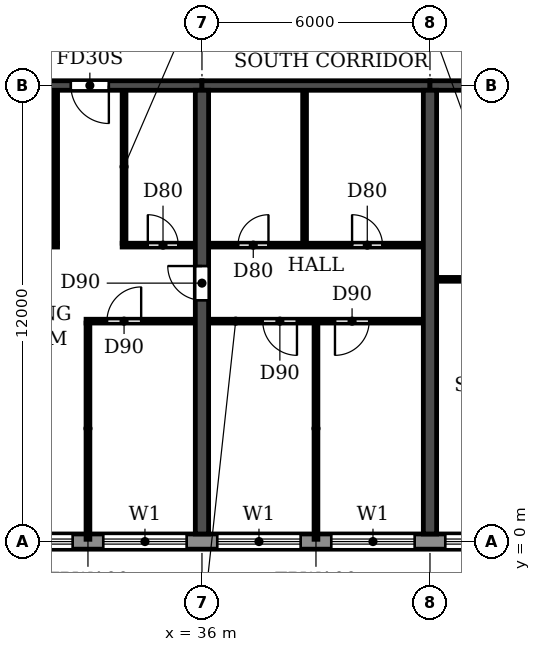
"""IFC4 building model, lengths in metres.
Left out: names, types, materials, properties, quantities, classifications, styles, units other than length and angle.
Written with IfcOpenShell. Run it as: python <this file> out.ifc"""

import sys

from ifc_helpers import new_model, si_unit, direction, frame, frame_2d, origin, place, context, subcontext, project, spatial, rectangle, extrude, element, fill, save


model = new_model("IFC4")
c1 = context("Model", 3, precision=1e-05, world=origin(), true_north=direction((0.0, 1.0)))
c2 = subcontext(c1, "Body", "Model", "MODEL_VIEW")
j1 = project(units=[si_unit("LENGTHUNIT", "METRE"), si_unit("PLANEANGLEUNIT", "RADIAN")], contexts=[c1])
p1 = place(None, origin())
s1 = spatial("IfcSite", under=j1, at=p1, CompositionType="ELEMENT")
p2 = place(p1, origin())
s2 = spatial("IfcBuilding", under=s1, at=p2, CompositionType="ELEMENT")
p3 = place(p2, frame((0.0, 0.0, 109.2)))
s3 = spatial("IfcBuildingStorey", under=s2, at=p3, CompositionType="ELEMENT", Elevation=109.2)
p4 = place(p3, frame((36.0, 0.2, 0.0), z_axis=(0.0, 0.0, 1.0), x_axis=(0.0, 1.0, 0.0)))
e1 = element("IfcWall", 1, at=p4, inside=s3, PredefinedType="SHEAR", context=c2, shape_type="SweptSolid", body=[
    extrude(rectangle(XDim=11.675, YDim=0.35, at=frame_2d((5.837, 0.0))), origin(), (0.0, 0.0, 1.0), 3.06),
])
p5 = place(p4, frame((6.15, 0.0, 0.0)))
e2 = element("IfcOpeningElement", 2, at=p5, cuts=e1, PredefinedType="OPENING", context=c2, shape_type="SweptSolid", body=[
    extrude(rectangle(XDim=0.9, YDim=2.1, at=frame_2d((0.45, 1.05))), frame((0.0, 0.185, 0.0), z_axis=(0.0, -1.0, 0.0), x_axis=(1.0, 0.0, 0.0)), (0.0, 0.0, 1.0), 0.37),
])
p6 = place(p3, frame((42.0, 0.2, 0.0), z_axis=(0.0, 0.0, 1.0), x_axis=(0.0, 1.0, 0.0)))
e3 = element("IfcWall", 3, at=p6, inside=s3, PredefinedType="SHEAR", context=c2, shape_type="SweptSolid", body=[
    extrude(rectangle(XDim=11.675, YDim=0.35, at=frame_2d((5.837, 0.0))), origin(), (0.0, 0.0, 1.0), 3.06),
])
p7 = place(p3, frame((30.0, 12.0, 0.0), z_axis=(0.0, 0.0, 1.0), x_axis=(1.0, 0.0, 0.0)))
e4 = element("IfcWall", 4, at=p7, inside=s3, PredefinedType="SHEAR", context=c2, shape_type="SweptSolid", body=[
    extrude(rectangle(XDim=6.0, YDim=0.25, at=frame_2d((3.0, 0.0))), origin(), (0.0, 0.0, 1.0), 2.46),
])
p8 = place(p7, frame((2.55, 0.0, 0.0)))
e5 = element("IfcOpeningElement", 5, at=p8, cuts=e4, PredefinedType="OPENING", context=c2, shape_type="SweptSolid", body=[
    extrude(rectangle(XDim=1.0, YDim=2.1, at=frame_2d((0.5, 1.05))), frame((0.0, 0.135, 0.0), z_axis=(0.0, -1.0, 0.0), x_axis=(1.0, 0.0, 0.0)), (0.0, 0.0, 1.0), 0.27),
])
p9 = place(p3, frame((36.0, 12.0, 0.0), z_axis=(0.0, 0.0, 1.0), x_axis=(1.0, 0.0, 0.0)))
e6 = element("IfcWall", 6, at=p9, inside=s3, PredefinedType="SHEAR", context=c2, shape_type="SweptSolid", body=[
    extrude(rectangle(XDim=6.0, YDim=0.25, at=frame_2d((3.0, 0.0))), origin(), (0.0, 0.0, 1.0), 2.46),
])
p10 = place(p3, frame((42.0, 12.0, 0.0), z_axis=(0.0, 0.0, 1.0), x_axis=(1.0, 0.0, 0.0)))
e7 = element("IfcWall", 7, at=p10, inside=s3, PredefinedType="SHEAR", context=c2, shape_type="SweptSolid", body=[
    extrude(rectangle(XDim=6.0, YDim=0.25, at=frame_2d((3.0, 0.0))), origin(), (0.0, 0.0, 1.0), 2.46),
])
p11 = place(p10, frame((2.45, 0.0, 0.0)))
e8 = element("IfcOpeningElement", 8, at=p11, cuts=e7, PredefinedType="OPENING", context=c2, shape_type="SweptSolid", body=[
    extrude(rectangle(XDim=1.0, YDim=2.1, at=frame_2d((0.5, 1.05))), frame((0.0, 0.135, 0.0), z_axis=(0.0, -1.0, 0.0), x_axis=(1.0, 0.0, 0.0)), (0.0, 0.0, 1.0), 0.27),
])
p12 = place(p3, frame((16.683, 0.0, 0.0), z_axis=(0.0, 0.0, 1.0), x_axis=(1.0, 0.0, 0.0)))
e9 = element("IfcWall", 9, at=p12, inside=s3, PredefinedType="STANDARD", context=c2, shape_type="SweptSolid", body=[
    extrude(rectangle(XDim=68.634, YDim=0.4, at=frame_2d((34.317, 0.0))), origin(), (0.0, 0.0, 1.0), 3.06),
])
p13 = place(p12, frame((1.717, 0.0, 0.9)))
e10 = element("IfcOpeningElement", 10, at=p13, cuts=e9, PredefinedType="OPENING", context=c2, shape_type="SweptSolid", body=[
    extrude(rectangle(XDim=2.2, YDim=1.5, at=frame_2d((1.1, 0.75))), frame((0.0, 0.21, 0.0), z_axis=(0.0, -1.0, 0.0), x_axis=(1.0, 0.0, 0.0)), (0.0, 0.0, 1.0), 0.42),
])
p14 = place(p12, frame((4.717, 0.0, 0.9)))
e11 = element("IfcOpeningElement", 11, at=p14, cuts=e9, PredefinedType="OPENING", context=c2, shape_type="SweptSolid", body=[
    extrude(rectangle(XDim=2.2, YDim=1.5, at=frame_2d((1.1, 0.75))), frame((0.0, 0.21, 0.0), z_axis=(0.0, -1.0, 0.0), x_axis=(1.0, 0.0, 0.0)), (0.0, 0.0, 1.0), 0.42),
])
p15 = place(p12, frame((7.717, 0.0, 0.9)))
e12 = element("IfcOpeningElement", 12, at=p15, cuts=e9, PredefinedType="OPENING", context=c2, shape_type="SweptSolid", body=[
    extrude(rectangle(XDim=2.2, YDim=1.5, at=frame_2d((1.1, 0.75))), frame((0.0, 0.21, 0.0), z_axis=(0.0, -1.0, 0.0), x_axis=(1.0, 0.0, 0.0)), (0.0, 0.0, 1.0), 0.42),
])
p16 = place(p12, frame((10.917, 0.0, 0.0)))
e13 = element("IfcOpeningElement", 13, at=p16, cuts=e9, PredefinedType="OPENING", context=c2, shape_type="SweptSolid", body=[
    extrude(rectangle(XDim=1.8, YDim=2.4, at=frame_2d((0.9, 1.2))), frame((0.0, 0.21, 0.0), z_axis=(0.0, -1.0, 0.0), x_axis=(1.0, 0.0, 0.0)), (0.0, 0.0, 1.0), 0.42),
])
p17 = place(p12, frame((13.717, 0.0, 0.9)))
e14 = element("IfcOpeningElement", 14, at=p17, cuts=e9, PredefinedType="OPENING", context=c2, shape_type="SweptSolid", body=[
    extrude(rectangle(XDim=2.2, YDim=1.5, at=frame_2d((1.1, 0.75))), frame((0.0, 0.21, 0.0), z_axis=(0.0, -1.0, 0.0), x_axis=(1.0, 0.0, 0.0)), (0.0, 0.0, 1.0), 0.42),
])
p18 = place(p12, frame((16.717, 0.0, 0.9)))
e15 = element("IfcOpeningElement", 15, at=p18, cuts=e9, PredefinedType="OPENING", context=c2, shape_type="SweptSolid", body=[
    extrude(rectangle(XDim=2.2, YDim=1.5, at=frame_2d((1.1, 0.75))), frame((0.0, 0.21, 0.0), z_axis=(0.0, -1.0, 0.0), x_axis=(1.0, 0.0, 0.0)), (0.0, 0.0, 1.0), 0.42),
])
p19 = place(p12, frame((19.717, 0.0, 0.9)))
e16 = element("IfcOpeningElement", 16, at=p19, cuts=e9, PredefinedType="OPENING", context=c2, shape_type="SweptSolid", body=[
    extrude(rectangle(XDim=2.2, YDim=1.5, at=frame_2d((1.1, 0.75))), frame((0.0, 0.21, 0.0), z_axis=(0.0, -1.0, 0.0), x_axis=(1.0, 0.0, 0.0)), (0.0, 0.0, 1.0), 0.42),
])
p20 = place(p12, frame((22.717, 0.0, 0.9)))
e17 = element("IfcOpeningElement", 17, at=p20, cuts=e9, PredefinedType="OPENING", context=c2, shape_type="SweptSolid", body=[
    extrude(rectangle(XDim=2.2, YDim=1.5, at=frame_2d((1.1, 0.75))), frame((0.0, 0.21, 0.0), z_axis=(0.0, -1.0, 0.0), x_axis=(1.0, 0.0, 0.0)), (0.0, 0.0, 1.0), 0.42),
])
p21 = place(p12, frame((25.717, 0.0, 0.9)))
e18 = element("IfcOpeningElement", 18, at=p21, cuts=e9, PredefinedType="OPENING", context=c2, shape_type="SweptSolid", body=[
    extrude(rectangle(XDim=2.2, YDim=1.5, at=frame_2d((1.1, 0.75))), frame((0.0, 0.21, 0.0), z_axis=(0.0, -1.0, 0.0), x_axis=(1.0, 0.0, 0.0)), (0.0, 0.0, 1.0), 0.42),
])
p22 = place(p12, frame((28.717, 0.0, 0.9)))
e19 = element("IfcOpeningElement", 19, at=p22, cuts=e9, PredefinedType="OPENING", context=c2, shape_type="SweptSolid", body=[
    extrude(rectangle(XDim=2.2, YDim=1.5, at=frame_2d((1.1, 0.75))), frame((0.0, 0.21, 0.0), z_axis=(0.0, -1.0, 0.0), x_axis=(1.0, 0.0, 0.0)), (0.0, 0.0, 1.0), 0.42),
])
p23 = place(p12, frame((31.917, 0.0, 0.0)))
e20 = element("IfcOpeningElement", 20, at=p23, cuts=e9, PredefinedType="OPENING", context=c2, shape_type="SweptSolid", body=[
    extrude(rectangle(XDim=1.8, YDim=2.4, at=frame_2d((0.9, 1.2))), frame((0.0, 0.21, 0.0), z_axis=(0.0, -1.0, 0.0), x_axis=(1.0, 0.0, 0.0)), (0.0, 0.0, 1.0), 0.42),
])
p24 = place(p12, frame((34.717, 0.0, 0.9)))
e21 = element("IfcOpeningElement", 21, at=p24, cuts=e9, PredefinedType="OPENING", context=c2, shape_type="SweptSolid", body=[
    extrude(rectangle(XDim=2.2, YDim=1.5, at=frame_2d((1.1, 0.75))), frame((0.0, 0.21, 0.0), z_axis=(0.0, -1.0, 0.0), x_axis=(1.0, 0.0, 0.0)), (0.0, 0.0, 1.0), 0.42),
])
p25 = place(p12, frame((37.717, 0.0, 0.9)))
e22 = element("IfcOpeningElement", 22, at=p25, cuts=e9, PredefinedType="OPENING", context=c2, shape_type="SweptSolid", body=[
    extrude(rectangle(XDim=2.2, YDim=1.5, at=frame_2d((1.1, 0.75))), frame((0.0, 0.21, 0.0), z_axis=(0.0, -1.0, 0.0), x_axis=(1.0, 0.0, 0.0)), (0.0, 0.0, 1.0), 0.42),
])
p26 = place(p12, frame((40.717, 0.0, 0.9)))
e23 = element("IfcOpeningElement", 23, at=p26, cuts=e9, PredefinedType="OPENING", context=c2, shape_type="SweptSolid", body=[
    extrude(rectangle(XDim=2.2, YDim=1.5, at=frame_2d((1.1, 0.75))), frame((0.0, 0.21, 0.0), z_axis=(0.0, -1.0, 0.0), x_axis=(1.0, 0.0, 0.0)), (0.0, 0.0, 1.0), 0.42),
])
p27 = place(p12, frame((43.717, 0.0, 0.9)))
e24 = element("IfcOpeningElement", 24, at=p27, cuts=e9, PredefinedType="OPENING", context=c2, shape_type="SweptSolid", body=[
    extrude(rectangle(XDim=2.2, YDim=1.5, at=frame_2d((1.1, 0.75))), frame((0.0, 0.21, 0.0), z_axis=(0.0, -1.0, 0.0), x_axis=(1.0, 0.0, 0.0)), (0.0, 0.0, 1.0), 0.42),
])
p28 = place(p12, frame((46.917, 0.0, 0.0)))
e25 = element("IfcOpeningElement", 25, at=p28, cuts=e9, PredefinedType="OPENING", context=c2, shape_type="SweptSolid", body=[
    extrude(rectangle(XDim=1.8, YDim=2.4, at=frame_2d((0.9, 1.2))), frame((0.0, 0.21, 0.0), z_axis=(0.0, -1.0, 0.0), x_axis=(1.0, 0.0, 0.0)), (0.0, 0.0, 1.0), 0.42),
])
p29 = place(p12, frame((49.717, 0.0, 0.9)))
e26 = element("IfcOpeningElement", 26, at=p29, cuts=e9, PredefinedType="OPENING", context=c2, shape_type="SweptSolid", body=[
    extrude(rectangle(XDim=2.2, YDim=1.5, at=frame_2d((1.1, 0.75))), frame((0.0, 0.21, 0.0), z_axis=(0.0, -1.0, 0.0), x_axis=(1.0, 0.0, 0.0)), (0.0, 0.0, 1.0), 0.42),
])
p30 = place(p12, frame((52.717, 0.0, 0.9)))
e27 = element("IfcOpeningElement", 27, at=p30, cuts=e9, PredefinedType="OPENING", context=c2, shape_type="SweptSolid", body=[
    extrude(rectangle(XDim=2.2, YDim=1.5, at=frame_2d((1.1, 0.75))), frame((0.0, 0.21, 0.0), z_axis=(0.0, -1.0, 0.0), x_axis=(1.0, 0.0, 0.0)), (0.0, 0.0, 1.0), 0.42),
])
p31 = place(p12, frame((55.717, 0.0, 0.9)))
e28 = element("IfcOpeningElement", 28, at=p31, cuts=e9, PredefinedType="OPENING", context=c2, shape_type="SweptSolid", body=[
    extrude(rectangle(XDim=2.2, YDim=1.5, at=frame_2d((1.1, 0.75))), frame((0.0, 0.21, 0.0), z_axis=(0.0, -1.0, 0.0), x_axis=(1.0, 0.0, 0.0)), (0.0, 0.0, 1.0), 0.42),
])
p32 = place(p12, frame((58.717, 0.0, 0.9)))
e29 = element("IfcOpeningElement", 29, at=p32, cuts=e9, PredefinedType="OPENING", context=c2, shape_type="SweptSolid", body=[
    extrude(rectangle(XDim=2.2, YDim=1.5, at=frame_2d((1.1, 0.75))), frame((0.0, 0.21, 0.0), z_axis=(0.0, -1.0, 0.0), x_axis=(1.0, 0.0, 0.0)), (0.0, 0.0, 1.0), 0.42),
])
p33 = place(p12, frame((61.717, 0.0, 0.9)))
e30 = element("IfcOpeningElement", 30, at=p33, cuts=e9, PredefinedType="OPENING", context=c2, shape_type="SweptSolid", body=[
    extrude(rectangle(XDim=2.2, YDim=1.5, at=frame_2d((1.1, 0.75))), frame((0.0, 0.21, 0.0), z_axis=(0.0, -1.0, 0.0), x_axis=(1.0, 0.0, 0.0)), (0.0, 0.0, 1.0), 0.42),
])
p34 = place(p12, frame((64.717, 0.0, 0.9)))
e31 = element("IfcOpeningElement", 31, at=p34, cuts=e9, PredefinedType="OPENING", context=c2, shape_type="SweptSolid", body=[
    extrude(rectangle(XDim=2.2, YDim=1.5, at=frame_2d((1.1, 0.75))), frame((0.0, 0.21, 0.0), z_axis=(0.0, -1.0, 0.0), x_axis=(1.0, 0.0, 0.0)), (0.0, 0.0, 1.0), 0.42),
])
p35 = place(p3, frame((32.95, 5.8, 0.0), z_axis=(0.0, 0.0, 1.0), x_axis=(1.0, 0.0, 0.0)))
e32 = element("IfcWall", 32, at=p35, inside=s3, PredefinedType="PARTITIONING", context=c2, shape_type="SweptSolid", body=[
    extrude(rectangle(XDim=2.865, YDim=0.1, at=frame_2d((1.433, 0.0))), origin(), (0.0, 0.0, 1.0), 3.06),
])
p36 = place(p35, frame((0.55, 0.0, 0.0)))
e33 = element("IfcOpeningElement", 33, at=p36, cuts=e32, PredefinedType="OPENING", context=c2, shape_type="SweptSolid", body=[
    extrude(rectangle(XDim=0.9, YDim=2.1, at=frame_2d((0.45, 1.05))), frame((0.0, 0.06, 0.0), z_axis=(0.0, -1.0, 0.0), x_axis=(1.0, 0.0, 0.0)), (0.0, 0.0, 1.0), 0.12),
])
p37 = place(p3, frame((36.185, 5.8, 0.0), z_axis=(0.0, 0.0, 1.0), x_axis=(1.0, 0.0, 0.0)))
e34 = element("IfcWall", 34, at=p37, inside=s3, PredefinedType="PARTITIONING", context=c2, shape_type="SweptSolid", body=[
    extrude(rectangle(XDim=5.63, YDim=0.1, at=frame_2d((2.815, 0.0))), origin(), (0.0, 0.0, 1.0), 3.06),
])
p38 = place(p37, frame((1.415, 0.0, 0.0)))
e35 = element("IfcOpeningElement", 35, at=p38, cuts=e34, PredefinedType="OPENING", context=c2, shape_type="SweptSolid", body=[
    extrude(rectangle(XDim=0.9, YDim=2.1, at=frame_2d((0.45, 1.05))), frame((0.0, 0.06, 0.0), z_axis=(0.0, -1.0, 0.0), x_axis=(1.0, 0.0, 0.0)), (0.0, 0.0, 1.0), 0.12),
])
p39 = place(p37, frame((3.315, 0.0, 0.0)))
e36 = element("IfcOpeningElement", 36, at=p39, cuts=e34, PredefinedType="OPENING", context=c2, shape_type="SweptSolid", body=[
    extrude(rectangle(XDim=0.9, YDim=2.1, at=frame_2d((0.45, 1.05))), frame((0.0, 0.06, 0.0), z_axis=(0.0, -1.0, 0.0), x_axis=(1.0, 0.0, 0.0)), (0.0, 0.0, 1.0), 0.12),
])
p40 = place(p3, frame((42.185, 6.9, 0.0), z_axis=(0.0, 0.0, 1.0), x_axis=(1.0, 0.0, 0.0)))
e37 = element("IfcWall", 37, at=p40, inside=s3, PredefinedType="PARTITIONING", context=c2, shape_type="SweptSolid", body=[
    extrude(rectangle(XDim=1.915, YDim=0.1, at=frame_2d((0.958, 0.0))), origin(), (0.0, 0.0, 1.0), 3.06),
])
p41 = place(p3, frame((30.185, 7.8, 0.0), z_axis=(0.0, 0.0, 1.0), x_axis=(1.0, 0.0, 0.0)))
e38 = element("IfcWall", 38, at=p41, inside=s3, PredefinedType="PARTITIONING", context=c2, shape_type="SweptSolid", body=[
    extrude(rectangle(XDim=2.015, YDim=0.1, at=frame_2d((1.007, 0.0))), origin(), (0.0, 0.0, 1.0), 3.06),
])
p42 = place(p41, frame((0.44, 0.0, 0.0)))
e39 = element("IfcOpeningElement", 39, at=p42, cuts=e38, PredefinedType="OPENING", context=c2, shape_type="SweptSolid", body=[
    extrude(rectangle(XDim=0.9, YDim=2.1, at=frame_2d((0.45, 1.05))), frame((0.0, 0.06, 0.0), z_axis=(0.0, -1.0, 0.0), x_axis=(1.0, 0.0, 0.0)), (0.0, 0.0, 1.0), 0.12),
])
p43 = place(p3, frame((33.9, 7.8, 0.0), z_axis=(0.0, 0.0, 1.0), x_axis=(1.0, 0.0, 0.0)))
e40 = element("IfcWall", 40, at=p43, inside=s3, PredefinedType="PARTITIONING", context=c2, shape_type="SweptSolid", body=[
    extrude(rectangle(XDim=1.915, YDim=0.1, at=frame_2d((0.958, 0.0))), origin(), (0.0, 0.0, 1.0), 3.06),
])
p44 = place(p43, frame((0.675, 0.0, 0.0)))
e41 = element("IfcOpeningElement", 41, at=p44, cuts=e40, PredefinedType="OPENING", context=c2, shape_type="SweptSolid", body=[
    extrude(rectangle(XDim=0.8, YDim=2.1, at=frame_2d((0.4, 1.05))), frame((0.0, 0.06, 0.0), z_axis=(0.0, -1.0, 0.0), x_axis=(1.0, 0.0, 0.0)), (0.0, 0.0, 1.0), 0.12),
])
p45 = place(p3, frame((36.185, 7.8, 0.0), z_axis=(0.0, 0.0, 1.0), x_axis=(1.0, 0.0, 0.0)))
e42 = element("IfcWall", 42, at=p45, inside=s3, PredefinedType="PARTITIONING", context=c2, shape_type="SweptSolid", body=[
    extrude(rectangle(XDim=5.63, YDim=0.1, at=frame_2d((2.815, 0.0))), origin(), (0.0, 0.0, 1.0), 3.06),
])
p46 = place(p45, frame((0.765, 0.0, 0.0)))
e43 = element("IfcOpeningElement", 43, at=p46, cuts=e42, PredefinedType="OPENING", context=c2, shape_type="SweptSolid", body=[
    extrude(rectangle(XDim=0.8, YDim=2.1, at=frame_2d((0.4, 1.05))), frame((0.0, 0.06, 0.0), z_axis=(0.0, -1.0, 0.0), x_axis=(1.0, 0.0, 0.0)), (0.0, 0.0, 1.0), 0.12),
])
p47 = place(p45, frame((3.765, 0.0, 0.0)))
e44 = element("IfcOpeningElement", 44, at=p47, cuts=e42, PredefinedType="OPENING", context=c2, shape_type="SweptSolid", body=[
    extrude(rectangle(XDim=0.8, YDim=2.1, at=frame_2d((0.4, 1.05))), frame((0.0, 0.06, 0.0), z_axis=(0.0, -1.0, 0.0), x_axis=(1.0, 0.0, 0.0)), (0.0, 0.0, 1.0), 0.12),
])
p48 = place(p3, frame((32.15, 7.85, 0.0), z_axis=(0.0, 0.0, 1.0), x_axis=(0.0, 1.0, 0.0)))
e45 = element("IfcWall", 45, at=p48, inside=s3, PredefinedType="PARTITIONING", context=c2, shape_type="SweptSolid", body=[
    extrude(rectangle(XDim=4.015, YDim=0.1, at=frame_2d((2.007, 0.0))), origin(), (0.0, 0.0, 1.0), 3.06),
])
p49 = place(p3, frame((33.0, 0.06, 0.0), z_axis=(0.0, 0.0, 1.0), x_axis=(0.0, 1.0, 0.0)))
e46 = element("IfcWall", 46, at=p49, inside=s3, PredefinedType="PARTITIONING", context=c2, shape_type="SweptSolid", body=[
    extrude(rectangle(XDim=5.69, YDim=0.1, at=frame_2d((2.845, 0.0))), origin(), (0.0, 0.0, 1.0), 3.06),
])
for number, where, z_axis, x_axis in (
    (47, (33.95, 7.85, 0.0), (0.0, 0.0, 1.0), (0.0, 1.0, 0.0)),
    (48, (38.7, 7.85, 0.0), (0.0, 0.0, 1.0), (0.0, 1.0, 0.0)),
):
    element("IfcWall", number, at=place(p3, frame(where, z_axis=z_axis, x_axis=x_axis)), inside=s3, PredefinedType="PARTITIONING", context=c2, shape_type="SweptSolid", body=[
        extrude(rectangle(XDim=4.015, YDim=0.1, at=frame_2d((2.007, 0.0))), origin(), (0.0, 0.0, 1.0), 3.06),
    ])
p50 = place(p3, frame((39.0, 0.06, 0.0), z_axis=(0.0, 0.0, 1.0), x_axis=(0.0, 1.0, 0.0)))
e49 = element("IfcWall", 49, at=p50, inside=s3, PredefinedType="PARTITIONING", context=c2, shape_type="SweptSolid", body=[
    extrude(rectangle(XDim=5.69, YDim=0.1, at=frame_2d((2.845, 0.0))), origin(), (0.0, 0.0, 1.0), 3.06),
])
p51 = place(p17, origin())
e50 = element("IfcWindow", 50, at=p51, inside=s3, PartitioningType="DOUBLE_PANEL_HORIZONTAL", PredefinedType="WINDOW", context=c2, shape_type="SweptSolid", body=[
    extrude(rectangle(XDim=2.2, YDim=1.5, at=frame_2d((1.1, 0.75))), frame((0.0, 0.03, 0.0), z_axis=(0.0, -1.0, 0.0), x_axis=(1.0, 0.0, 0.0)), (0.0, 0.0, 1.0), 0.06),
])
fill(e14, e50)
p52 = place(p18, origin())
e51 = element("IfcWindow", 51, at=p52, inside=s3, PartitioningType="DOUBLE_PANEL_HORIZONTAL", PredefinedType="WINDOW", context=c2, shape_type="SweptSolid", body=[
    extrude(rectangle(XDim=2.2, YDim=1.5, at=frame_2d((1.1, 0.75))), frame((0.0, 0.03, 0.0), z_axis=(0.0, -1.0, 0.0), x_axis=(1.0, 0.0, 0.0)), (0.0, 0.0, 1.0), 0.06),
])
fill(e15, e51)
p53 = place(p19, origin())
e52 = element("IfcWindow", 52, at=p53, inside=s3, PartitioningType="DOUBLE_PANEL_HORIZONTAL", PredefinedType="WINDOW", context=c2, shape_type="SweptSolid", body=[
    extrude(rectangle(XDim=2.2, YDim=1.5, at=frame_2d((1.1, 0.75))), frame((0.0, 0.03, 0.0), z_axis=(0.0, -1.0, 0.0), x_axis=(1.0, 0.0, 0.0)), (0.0, 0.0, 1.0), 0.06),
])
fill(e16, e52)
p54 = place(p20, origin())
e53 = element("IfcWindow", 53, at=p54, inside=s3, PartitioningType="DOUBLE_PANEL_HORIZONTAL", PredefinedType="WINDOW", context=c2, shape_type="SweptSolid", body=[
    extrude(rectangle(XDim=2.2, YDim=1.5, at=frame_2d((1.1, 0.75))), frame((0.0, 0.03, 0.0), z_axis=(0.0, -1.0, 0.0), x_axis=(1.0, 0.0, 0.0)), (0.0, 0.0, 1.0), 0.06),
])
fill(e17, e53)
p55 = place(p21, origin())
e54 = element("IfcWindow", 54, at=p55, inside=s3, PartitioningType="DOUBLE_PANEL_HORIZONTAL", PredefinedType="WINDOW", context=c2, shape_type="SweptSolid", body=[
    extrude(rectangle(XDim=2.2, YDim=1.5, at=frame_2d((1.1, 0.75))), frame((0.0, 0.03, 0.0), z_axis=(0.0, -1.0, 0.0), x_axis=(1.0, 0.0, 0.0)), (0.0, 0.0, 1.0), 0.06),
])
fill(e18, e54)
p56 = place(p46, origin())
e55 = element("IfcDoor", 55, at=p56, inside=s3, OperationType="SINGLE_SWING_RIGHT", PredefinedType="DOOR", context=c2, shape_type="SweptSolid", body=[
    extrude(rectangle(XDim=0.8, YDim=2.1, at=frame_2d((0.4, 1.05))), frame((0.0, 0.025, 0.0), z_axis=(0.0, -1.0, 0.0), x_axis=(1.0, 0.0, 0.0)), (0.0, 0.0, 1.0), 0.05),
])
fill(e43, e55)
p57 = place(p38, frame((0.9, 0.0, 0.0), z_axis=(0.0, 0.0, 1.0), x_axis=(-1.0, 0.0, 0.0)))
e56 = element("IfcDoor", 56, at=p57, inside=s3, OperationType="SINGLE_SWING_LEFT", PredefinedType="DOOR", context=c2, shape_type="SweptSolid", body=[
    extrude(rectangle(XDim=0.9, YDim=2.1, at=frame_2d((0.45, 1.05))), frame((0.0, 0.025, 0.0), z_axis=(0.0, -1.0, 0.0), x_axis=(1.0, 0.0, 0.0)), (0.0, 0.0, 1.0), 0.05),
])
fill(e35, e56)
p58 = place(p39, frame((0.9, 0.0, 0.0), z_axis=(0.0, 0.0, 1.0), x_axis=(-1.0, 0.0, 0.0)))
e57 = element("IfcDoor", 57, at=p58, inside=s3, OperationType="SINGLE_SWING_RIGHT", PredefinedType="DOOR", context=c2, shape_type="SweptSolid", body=[
    extrude(rectangle(XDim=0.9, YDim=2.1, at=frame_2d((0.45, 1.05))), frame((0.0, 0.025, 0.0), z_axis=(0.0, -1.0, 0.0), x_axis=(1.0, 0.0, 0.0)), (0.0, 0.0, 1.0), 0.05),
])
fill(e36, e57)
p59 = place(p47, origin())
e58 = element("IfcDoor", 58, at=p59, inside=s3, OperationType="SINGLE_SWING_LEFT", PredefinedType="DOOR", context=c2, shape_type="SweptSolid", body=[
    extrude(rectangle(XDim=0.8, YDim=2.1, at=frame_2d((0.4, 1.05))), frame((0.0, 0.025, 0.0), z_axis=(0.0, -1.0, 0.0), x_axis=(1.0, 0.0, 0.0)), (0.0, 0.0, 1.0), 0.05),
])
fill(e44, e58)
p60 = place(p8, frame((1.0, 0.0, 0.0), z_axis=(0.0, 0.0, 1.0), x_axis=(-1.0, 0.0, 0.0)))
e59 = element("IfcDoor", 59, at=p60, inside=s3, OperationType="SINGLE_SWING_LEFT", PredefinedType="DOOR", context=c2, shape_type="SweptSolid", body=[
    extrude(rectangle(XDim=1.0, YDim=2.1, at=frame_2d((0.5, 1.05))), frame((0.0, 0.025, 0.0), z_axis=(0.0, -1.0, 0.0), x_axis=(1.0, 0.0, 0.0)), (0.0, 0.0, 1.0), 0.05),
])
fill(e5, e59)
p61 = place(p36, origin())
e60 = element("IfcDoor", 60, at=p61, inside=s3, OperationType="SINGLE_SWING_RIGHT", PredefinedType="DOOR", context=c2, shape_type="SweptSolid", body=[
    extrude(rectangle(XDim=0.9, YDim=2.1, at=frame_2d((0.45, 1.05))), frame((0.0, 0.025, 0.0), z_axis=(0.0, -1.0, 0.0), x_axis=(1.0, 0.0, 0.0)), (0.0, 0.0, 1.0), 0.05),
])
fill(e33, e60)
p62 = place(p44, origin())
e61 = element("IfcDoor", 61, at=p62, inside=s3, OperationType="SINGLE_SWING_LEFT", PredefinedType="DOOR", context=c2, shape_type="SweptSolid", body=[
    extrude(rectangle(XDim=0.8, YDim=2.1, at=frame_2d((0.4, 1.05))), frame((0.0, 0.025, 0.0), z_axis=(0.0, -1.0, 0.0), x_axis=(1.0, 0.0, 0.0)), (0.0, 0.0, 1.0), 0.05),
])
fill(e41, e61)
p63 = place(p5, origin())
e62 = element("IfcDoor", 62, at=p63, inside=s3, OperationType="SINGLE_SWING_RIGHT", PredefinedType="DOOR", context=c2, shape_type="SweptSolid", body=[
    extrude(rectangle(XDim=0.9, YDim=2.1, at=frame_2d((0.45, 1.05))), frame((0.0, 0.025, 0.0), z_axis=(0.0, -1.0, 0.0), x_axis=(1.0, 0.0, 0.0)), (0.0, 0.0, 1.0), 0.05),
])
fill(e2, e62)
save(model, sys.argv[1])
